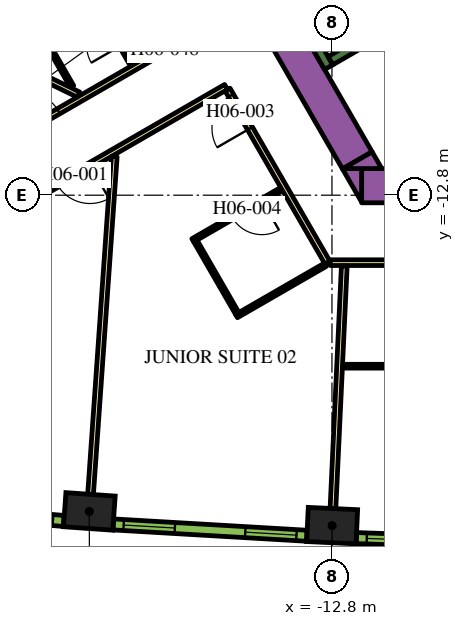
"""IFC4 building model, lengths in metres.
Left out: names, types, materials, properties, quantities, classifications, styles, units other than length and angle.
Written with IfcOpenShell. Run it as: python <this file> out.ifc"""

import sys

from ifc_helpers import new_model, si_unit, direction, frame, frame_2d, origin, origin_2d, place, context, subcontext, project, spatial, polyline, rectangle, outline, extrude, element, fill, save


model = new_model("IFC4")
c1 = context("Model", 3, precision=1e-05, world=origin(), true_north=direction((0.0, 1.0)))
c2 = subcontext(c1, "Body", "Model", "MODEL_VIEW")
j1 = project(units=[si_unit("LENGTHUNIT", "METRE"), si_unit("PLANEANGLEUNIT", "RADIAN")], contexts=[c1])
p1 = place(None, origin())
s1 = spatial("IfcSite", under=j1, at=p1, CompositionType="ELEMENT")
p2 = place(p1, origin())
s2 = spatial("IfcBuilding", under=s1, at=p2, CompositionType="ELEMENT")
p3 = place(p2, frame((0.0, 0.0, 91.5)))
s3 = spatial("IfcBuildingStorey", under=s2, at=p3, CompositionType="ELEMENT", Elevation=91.5)
for number, where, z_axis, x_axis in (
    (1, (-19.184, -21.12, 0.0), (0.0, 0.0, 1.0), (0.998, -0.07, 0.0)),
    (2, (-12.795, -21.494, 0.0), (0.0, 0.0, 1.0), (0.999, -0.047, 0.0)),
):
    element("IfcColumn", number, at=place(p3, frame(where, z_axis=z_axis, x_axis=x_axis)), inside=s3, PredefinedType="COLUMN", context=c2, shape_type="SweptSolid", body=[
        extrude(rectangle(XDim=1.3, YDim=0.9, at=origin_2d()), origin(), (0.0, 0.0, 1.0), 3.9),
    ])
p4 = place(p3, frame((-12.019, -12.55, 0.0), z_axis=(0.0, 0.0, 1.0), x_axis=(1.0, 0.0, 0.0)))
e3 = element("IfcWall", 3, at=p4, inside=s3, PredefinedType="SOLIDWALL", context=c2, shape_type="SweptSolid", body=[
    extrude(rectangle(XDim=21.63, YDim=0.9, at=frame_2d((10.815, 0.0))), origin(), (0.0, 0.0, 1.0), 3.9),
])
p5 = place(p3, origin())
e4 = element("IfcWall", 4, at=p5, inside=s3, PredefinedType="SOLIDWALL", context=c2, shape_type="SweptSolid", body=[
    extrude(outline(polyline([(-12.529, -12.1), (-12.021, -12.1), (-12.021, -12.98), (-12.529, -12.1)])), origin(), (0.0, 0.0, 1.0), 3.9),
])
p6 = place(p3, frame((-12.134, -11.883, 0.0), z_axis=(0.0, 0.0, 1.0), x_axis=(-0.500005339912, 0.866022320763, 0.0)))
e5 = element("IfcWall", 5, at=p6, inside=s3, PredefinedType="SOLIDWALL", context=c2, shape_type="SweptSolid", body=[
    extrude(rectangle(XDim=9.488, YDim=0.9, at=frame_2d((4.744, 0.0))), origin(), (0.0, 0.0, 1.0), 3.9),
])
e6 = element("IfcWall", 6, at=p5, inside=s3, PredefinedType="SOLIDWALL", context=c2, shape_type="SweptSolid", body=[
    extrude(outline(polyline([(-11.489, -12.1), (-12.505, -12.1), (-11.743, -11.66), (-11.489, -12.1)])), origin(), (0.0, 0.0, 1.0), 3.9),
])
p7 = place(p3, frame((-12.885, -9.431, 0.0), z_axis=(0.0, 0.0, 1.0), x_axis=(-0.500020560727, 0.866013532718, 0.0)))
e7 = element("IfcWall", 7, at=p7, inside=s3, PredefinedType="SOLIDWALL", context=c2, shape_type="SweptSolid", body=[
    extrude(rectangle(XDim=3.45, YDim=0.25, at=frame_2d((1.725, 0.0))), origin(), (0.0, 0.0, 1.0), 3.9),
])
p8 = place(p3, frame((-12.84, -9.261, 0.0), z_axis=(0.0, 0.0, 1.0), x_axis=(0.866016039709, 0.500016218704, 0.0)))
e8 = element("IfcWall", 8, at=p8, inside=s3, PredefinedType="SOLIDWALL", context=c2, shape_type="SweptSolid", body=[
    extrude(rectangle(XDim=7.05, YDim=0.25, at=frame_2d((3.525, 0.0))), origin(), (0.0, 0.0, 1.0), 3.9),
])
p9 = place(p3, frame((-28.211, -15.335, 0.0), z_axis=(0.0, 0.0, 1.0), x_axis=(0.866025884867, 0.49999916674, 0.0)))
e9 = element("IfcWall", 9, at=p9, inside=s3, PredefinedType="PARTITIONING", context=c2, shape_type="SweptSolid", body=[
    extrude(rectangle(XDim=13.543, YDim=0.15, at=frame_2d((6.772, 0.0))), origin(), (0.0, 0.0, 1.0), 2.75),
])
p10 = place(p9, frame((12.214, 0.0, 0.0)))
e10 = element("IfcOpeningElement", 10, at=p10, cuts=e9, PredefinedType="OPENING", context=c2, shape_type="SweptSolid", body=[
    extrude(rectangle(XDim=1.0, YDim=2.1, at=frame_2d((0.5, 1.05))), frame((0.0, 0.085, 0.0), z_axis=(0.0, -1.0, 0.0), x_axis=(1.0, 0.0, 0.0)), (0.0, 0.0, 1.0), 0.17),
])
p11 = place(p9, frame((8.488, 0.0, 0.0)))
e11 = element("IfcOpeningElement", 11, at=p11, cuts=e9, PredefinedType="OPENING", context=c2, shape_type="SweptSolid", body=[
    extrude(rectangle(XDim=1.0, YDim=2.1, at=frame_2d((0.5, 1.05))), frame((0.0, 0.085, 0.0), z_axis=(0.0, -1.0, 0.0), x_axis=(1.0, 0.0, 0.0)), (0.0, 0.0, 1.0), 0.17),
])
p12 = place(p3, frame((-15.587, -9.952, 0.0), z_axis=(0.0, 0.0, 1.0), x_axis=(-0.866017869832, -0.500013048961, 0.0)))
e12 = element("IfcWall", 12, at=p12, inside=s3, PredefinedType="PARTITIONING", context=c2, shape_type="SweptSolid", body=[
    extrude(rectangle(XDim=13.624, YDim=0.15, at=frame_2d((6.812, 0.0))), origin(), (0.0, 0.0, 1.0), 2.75),
])
p13 = place(p12, frame((4.134, 0.0, 0.0)))
e13 = element("IfcOpeningElement", 13, at=p13, cuts=e12, PredefinedType="OPENING", context=c2, shape_type="SweptSolid", body=[
    extrude(rectangle(XDim=1.0, YDim=2.1, at=frame_2d((0.5, 1.05))), frame((0.0, 0.085, 0.0), z_axis=(0.0, -1.0, 0.0), x_axis=(1.0, 0.0, 0.0)), (0.0, 0.0, 1.0), 0.17),
])
p14 = place(p3, frame((-12.918, -14.575, 0.0), z_axis=(0.0, 0.0, 1.0), x_axis=(-0.500009150678, 0.866020120573, 0.0)))
e14 = element("IfcWall", 14, at=p14, inside=s3, PredefinedType="PARTITIONING", context=c2, shape_type="SweptSolid", body=[
    extrude(rectangle(XDim=5.258, YDim=0.15, at=frame_2d((2.629, 0.0))), origin(), (0.0, 0.0, 1.0), 2.75),
])
p15 = place(p14, frame((4.078, 0.0, 0.0)))
e15 = element("IfcOpeningElement", 15, at=p15, cuts=e14, PredefinedType="OPENING", context=c2, shape_type="SweptSolid", body=[
    extrude(rectangle(XDim=1.0, YDim=2.1, at=frame_2d((0.5, 1.05))), frame((0.0, 0.085, 0.0), z_axis=(0.0, -1.0, 0.0), x_axis=(1.0, 0.0, 0.0)), (0.0, 0.0, 1.0), 0.17),
])
p16 = place(p3, frame((12.918, -14.575, 0.0), z_axis=(0.0, 0.0, 1.0), x_axis=(-1.0, 0.0, 0.0)))
e16 = element("IfcWall", 16, at=p16, inside=s3, PredefinedType="PARTITIONING", context=c2, shape_type="SweptSolid", body=[
    extrude(rectangle(XDim=25.766, YDim=0.15, at=frame_2d((12.883, 0.0))), origin(), (0.0, 0.0, 1.0), 2.75),
])
p17 = place(p16, frame((19.306, 0.0, 0.0)))
e17 = element("IfcOpeningElement", 17, at=p17, cuts=e16, PredefinedType="OPENING", context=c2, shape_type="SweptSolid", body=[
    extrude(rectangle(XDim=1.0, YDim=2.1, at=frame_2d((0.5, 1.05))), frame((0.0, 0.085, 0.0), z_axis=(0.0, -1.0, 0.0), x_axis=(1.0, 0.0, 0.0)), (0.0, 0.0, 1.0), 0.17),
])
p18 = place(p16, frame((17.999, 0.0, 0.0)))
e18 = element("IfcOpeningElement", 18, at=p18, cuts=e16, PredefinedType="OPENING", context=c2, shape_type="SweptSolid", body=[
    extrude(rectangle(XDim=1.0, YDim=2.1, at=frame_2d((0.5, 1.05))), frame((0.0, 0.085, 0.0), z_axis=(0.0, -1.0, 0.0), x_axis=(1.0, 0.0, 0.0)), (0.0, 0.0, 1.0), 0.17),
])
p19 = place(p16, frame((10.874, 0.0, 0.0)))
e19 = element("IfcOpeningElement", 19, at=p19, cuts=e16, PredefinedType="OPENING", context=c2, shape_type="SweptSolid", body=[
    extrude(rectangle(XDim=0.9, YDim=2.1, at=frame_2d((0.45, 1.05))), frame((0.0, 0.085, 0.0), z_axis=(0.0, -1.0, 0.0), x_axis=(1.0, 0.0, 0.0)), (0.0, 0.0, 1.0), 0.17),
])
p20 = place(p16, frame((8.647, 0.0, 0.0)))
e20 = element("IfcOpeningElement", 20, at=p20, cuts=e16, PredefinedType="OPENING", context=c2, shape_type="SweptSolid", body=[
    extrude(rectangle(XDim=1.0, YDim=2.1, at=frame_2d((0.5, 1.05))), frame((0.0, 0.085, 0.0), z_axis=(0.0, -1.0, 0.0), x_axis=(1.0, 0.0, 0.0)), (0.0, 0.0, 1.0), 0.17),
])
p21 = place(p16, frame((0.18, 0.0, 0.0)))
e21 = element("IfcOpeningElement", 21, at=p21, cuts=e16, PredefinedType="OPENING", context=c2, shape_type="SweptSolid", body=[
    extrude(rectangle(XDim=1.0, YDim=2.1, at=frame_2d((0.5, 1.05))), frame((0.0, 0.085, 0.0), z_axis=(0.0, -1.0, 0.0), x_axis=(1.0, 0.0, 0.0)), (0.0, 0.0, 1.0), 0.17),
])
p22 = place(p3, frame((-27.479, -6.251, 0.0), z_axis=(0.0, 0.0, 1.0), x_axis=(0.898945877276, -0.438059710231, 0.0)))
e22 = element("IfcWall", 22, at=p22, inside=s3, PredefinedType="PARTITIONING", context=c2, shape_type="SweptSolid", body=[
    extrude(rectangle(XDim=8.909, YDim=0.15, at=frame_2d((4.455, 0.0))), origin(), (0.0, 0.0, 1.0), 2.75),
])
p23 = place(p3, frame((-19.153, -20.671, 0.0), z_axis=(0.0, 0.0, 1.0), x_axis=(0.070070736723, 0.997542025107, 0.0)))
e23 = element("IfcWall", 23, at=p23, inside=s3, PredefinedType="PARTITIONING", context=c2, shape_type="SweptSolid", body=[
    extrude(rectangle(XDim=8.909, YDim=0.15, at=frame_2d((4.455, 0.0))), origin(), (0.0, 0.0, 1.0), 2.75),
])
p24 = place(p3, frame((-12.774, -21.045, 0.0), z_axis=(0.0, 0.0, 1.0), x_axis=(0.046750341626, 0.998906605023, 0.0)))
e24 = element("IfcWall", 24, at=p24, inside=s3, PredefinedType="PARTITIONING", context=c2, shape_type="SweptSolid", body=[
    extrude(rectangle(XDim=6.392, YDim=0.15, at=frame_2d((3.196, 0.0))), origin(), (0.0, 0.0, 1.0), 2.75),
])
p25 = place(p3, frame((-14.123, -12.638, 0.0), z_axis=(0.0, 0.0, 1.0), x_axis=(-0.86599734893, -0.500048589285, 0.0)))
e25 = element("IfcWall", 25, at=p25, inside=s3, PredefinedType="PARTITIONING", context=c2, shape_type="SweptSolid", body=[
    extrude(rectangle(XDim=2.7, YDim=0.1, at=frame_2d((1.35, 0.0))), origin(), (0.0, 0.0, 1.0), 2.75),
])
p26 = place(p25, frame((0.6, 0.0, 0.0)))
e26 = element("IfcOpeningElement", 26, at=p26, cuts=e25, PredefinedType="OPENING", context=c2, shape_type="SweptSolid", body=[
    extrude(rectangle(XDim=0.9, YDim=2.1, at=frame_2d((0.45, 1.05))), frame((0.0, 0.06, 0.0), z_axis=(0.0, -1.0, 0.0), x_axis=(1.0, 0.0, 0.0)), (0.0, 0.0, 1.0), 0.12),
])
p27 = place(p3, frame((-16.393, -14.006, 0.0), z_axis=(0.0, 0.0, 1.0), x_axis=(0.499946605688, -0.86605622881, 0.0)))
e27 = element("IfcWall", 27, at=p27, inside=s3, PredefinedType="PARTITIONING", context=c2, shape_type="SweptSolid", body=[
    extrude(rectangle(XDim=2.2, YDim=0.1, at=frame_2d((1.1, 0.0))), origin(), (0.0, 0.0, 1.0), 2.75),
])
p28 = place(p3, frame((-12.973, -14.63, 0.0), z_axis=(0.0, 0.0, 1.0), x_axis=(-0.866036505625, -0.499980770555, 0.0)))
e28 = element("IfcWall", 28, at=p28, inside=s3, PredefinedType="PARTITIONING", context=c2, shape_type="SweptSolid", body=[
    extrude(rectangle(XDim=2.7, YDim=0.1, at=frame_2d((1.35, 0.0))), origin(), (0.0, 0.0, 1.0), 2.75),
])
p29 = place(p3, frame((-10.272, -17.3, 0.0), z_axis=(0.0, 0.0, 1.0), x_axis=(-1.0, 0.0, 0.0)))
e29 = element("IfcWall", 29, at=p29, inside=s3, PredefinedType="PARTITIONING", context=c2, shape_type="SweptSolid", body=[
    extrude(rectangle(XDim=2.25, YDim=0.1, at=frame_2d((1.125, 0.0))), origin(), (0.0, 0.0, 1.0), 2.75),
])
p30 = place(p3, frame((-18.055, -9.385, 0.0), z_axis=(0.0, 0.0, 1.0), x_axis=(-0.499939757307, 0.866060182126, 0.0)))
e30 = element("IfcWall", 30, at=p30, inside=s3, PredefinedType="PARTITIONING", context=c2, shape_type="SweptSolid", body=[
    extrude(rectangle(XDim=2.95, YDim=0.1, at=frame_2d((1.475, 0.0))), origin(), (0.0, 0.0, 1.0), 2.75),
])
p31 = place(p30, frame((0.6, 0.0, 0.0)))
e31 = element("IfcOpeningElement", 31, at=p31, cuts=e30, PredefinedType="OPENING", context=c2, shape_type="SweptSolid", body=[
    extrude(rectangle(XDim=0.9, YDim=2.1, at=frame_2d((0.45, 1.05))), frame((0.0, 0.06, 0.0), z_axis=(0.0, -1.0, 0.0), x_axis=(1.0, 0.0, 0.0)), (0.0, 0.0, 1.0), 0.12),
])
p32 = place(p3, frame((-19.639, -9.941, 0.0), z_axis=(0.0, 0.0, 1.0), x_axis=(-0.499938597367, 0.866060851709, 0.0)))
e32 = element("IfcWall", 32, at=p32, inside=s3, PredefinedType="PARTITIONING", context=c2, shape_type="SweptSolid", body=[
    extrude(rectangle(XDim=2.64, YDim=0.1, at=frame_2d((1.32, 0.0))), origin(), (0.0, 0.0, 1.0), 2.75),
])
p33 = place(p3, frame((-24.946, -20.954, 0.0), z_axis=(0.0, 0.0, 1.0), x_axis=(0.99665273362, -0.081751627308, 0.0)))
e33 = element("IfcWall", 33, at=p33, inside=s3, PredefinedType="SOLIDWALL", context=c2, shape_type="SweptSolid", body=[
    extrude(rectangle(XDim=5.107, YDim=0.29, at=frame_2d((2.553, 0.0))), origin(), (0.0, 0.0, 1.0), 3.65),
])
p34 = place(p33, frame((0.24, 0.0, 0.9)))
e34 = element("IfcOpeningElement", 34, at=p34, cuts=e33, PredefinedType="OPENING", context=c2, shape_type="SweptSolid", body=[
    extrude(rectangle(XDim=1.35, YDim=2.15, at=frame_2d((0.675, 1.075))), frame((0.0, 0.155, 0.0), z_axis=(0.0, -1.0, 0.0), x_axis=(1.0, 0.0, 0.0)), (0.0, 0.0, 1.0), 0.31),
])
p35 = place(p33, frame((3.471, 0.0, 0.9)))
e35 = element("IfcOpeningElement", 35, at=p35, cuts=e33, PredefinedType="OPENING", context=c2, shape_type="SweptSolid", body=[
    extrude(rectangle(XDim=1.35, YDim=2.15, at=frame_2d((0.675, 1.075))), frame((0.0, 0.155, 0.0), z_axis=(0.0, -1.0, 0.0), x_axis=(1.0, 0.0, 0.0)), (0.0, 0.0, 1.0), 0.31),
])
p36 = place(p3, frame((-18.553, -21.463, 0.0), z_axis=(0.0, 0.0, 1.0), x_axis=(0.998290511436, -0.058447025388, 0.0)))
e36 = element("IfcWall", 36, at=p36, inside=s3, PredefinedType="SOLIDWALL", context=c2, shape_type="SweptSolid", body=[
    extrude(rectangle(XDim=5.1, YDim=0.29, at=frame_2d((2.55, 0.0))), origin(), (0.0, 0.0, 1.0), 3.65),
])
p37 = place(p36, frame((0.273, 0.0, 0.9)))
e37 = element("IfcOpeningElement", 37, at=p37, cuts=e36, PredefinedType="OPENING", context=c2, shape_type="SweptSolid", body=[
    extrude(rectangle(XDim=1.35, YDim=2.15, at=frame_2d((0.675, 1.075))), frame((0.0, 0.155, 0.0), z_axis=(0.0, -1.0, 0.0), x_axis=(1.0, 0.0, 0.0)), (0.0, 0.0, 1.0), 0.31),
])
p38 = place(p36, frame((3.478, 0.0, 0.9)))
e38 = element("IfcOpeningElement", 38, at=p38, cuts=e36, PredefinedType="OPENING", context=c2, shape_type="SweptSolid", body=[
    extrude(rectangle(XDim=1.35, YDim=2.15, at=frame_2d((0.675, 1.075))), frame((0.0, 0.155, 0.0), z_axis=(0.0, -1.0, 0.0), x_axis=(1.0, 0.0, 0.0)), (0.0, 0.0, 1.0), 0.31),
])
p39 = place(p3, frame((-12.157, -21.822, 0.0), z_axis=(0.0, 0.0, 1.0), x_axis=(0.999385993957, -0.035037623812, 0.0)))
e39 = element("IfcWall", 39, at=p39, inside=s3, PredefinedType="SOLIDWALL", context=c2, shape_type="SweptSolid", body=[
    extrude(rectangle(XDim=5.101, YDim=0.29, at=frame_2d((2.55, 0.0))), origin(), (0.0, 0.0, 1.0), 3.65),
])
p40 = place(p39, frame((0.273, 0.0, 0.9)))
e40 = element("IfcOpeningElement", 40, at=p40, cuts=e39, PredefinedType="OPENING", context=c2, shape_type="SweptSolid", body=[
    extrude(rectangle(XDim=1.35, YDim=2.15, at=frame_2d((0.675, 1.075))), frame((0.0, 0.155, 0.0), z_axis=(0.0, -1.0, 0.0), x_axis=(1.0, 0.0, 0.0)), (0.0, 0.0, 1.0), 0.31),
])
p41 = place(p39, frame((3.478, 0.0, 0.9)))
e41 = element("IfcOpeningElement", 41, at=p41, cuts=e39, PredefinedType="OPENING", context=c2, shape_type="SweptSolid", body=[
    extrude(rectangle(XDim=1.35, YDim=2.15, at=frame_2d((0.675, 1.075))), frame((0.0, 0.155, 0.0), z_axis=(0.0, -1.0, 0.0), x_axis=(1.0, 0.0, 0.0)), (0.0, 0.0, 1.0), 0.31),
])
p42 = place(p13, origin())
e42 = element("IfcDoor", 42, at=p42, inside=s3, OperationType="SINGLE_SWING_LEFT", PredefinedType="DOOR", context=c2, shape_type="SweptSolid", body=[
    extrude(rectangle(XDim=1.0, YDim=2.1, at=frame_2d((0.5, 1.05))), frame((0.0, 0.025, 0.0), z_axis=(0.0, -1.0, 0.0), x_axis=(1.0, 0.0, 0.0)), (0.0, 0.0, 1.0), 0.05),
])
fill(e13, e42)
p43 = place(p15, origin())
e43 = element("IfcDoor", 43, at=p43, inside=s3, OperationType="SINGLE_SWING_RIGHT", PredefinedType="DOOR", context=c2, shape_type="SweptSolid", body=[
    extrude(rectangle(XDim=1.0, YDim=2.1, at=frame_2d((0.5, 1.05))), frame((0.0, 0.025, 0.0), z_axis=(0.0, -1.0, 0.0), x_axis=(1.0, 0.0, 0.0)), (0.0, 0.0, 1.0), 0.05),
])
fill(e15, e43)
p44 = place(p26, origin())
e44 = element("IfcDoor", 44, at=p44, inside=s3, OperationType="SINGLE_SWING_LEFT", PredefinedType="DOOR", context=c2, shape_type="SweptSolid", body=[
    extrude(rectangle(XDim=0.9, YDim=2.1, at=frame_2d((0.45, 1.05))), frame((0.0, 0.025, 0.0), z_axis=(0.0, -1.0, 0.0), x_axis=(1.0, 0.0, 0.0)), (0.0, 0.0, 1.0), 0.05),
])
fill(e26, e44)
p45 = place(p10, origin())
e45 = element("IfcDoor", 45, at=p45, inside=s3, OperationType="SINGLE_SWING_RIGHT", PredefinedType="DOOR", context=c2, shape_type="SweptSolid", body=[
    extrude(rectangle(XDim=1.0, YDim=2.1, at=frame_2d((0.5, 1.05))), frame((0.0, 0.025, 0.0), z_axis=(0.0, -1.0, 0.0), x_axis=(1.0, 0.0, 0.0)), (0.0, 0.0, 1.0), 0.05),
])
fill(e10, e45)
p46 = place(p11, origin())
e46 = element("IfcDoor", 46, at=p46, inside=s3, OperationType="SINGLE_SWING_RIGHT", PredefinedType="DOOR", context=c2, shape_type="SweptSolid", body=[
    extrude(rectangle(XDim=1.0, YDim=2.1, at=frame_2d((0.5, 1.05))), frame((0.0, 0.025, 0.0), z_axis=(0.0, -1.0, 0.0), x_axis=(1.0, 0.0, 0.0)), (0.0, 0.0, 1.0), 0.05),
])
fill(e11, e46)
p47 = place(p35, origin())
e47 = element("IfcWindow", 47, at=p47, inside=s3, PartitioningType="DOUBLE_PANEL_VERTICAL", PredefinedType="WINDOW", context=c2, shape_type="SweptSolid", body=[
    extrude(rectangle(XDim=1.35, YDim=2.15, at=frame_2d((0.675, 1.075))), frame((0.0, 0.015, 0.0), z_axis=(0.0, -1.0, 0.0), x_axis=(1.0, 0.0, 0.0)), (0.0, 0.0, 1.0), 0.06),
])
fill(e35, e47)
p48 = place(p37, origin())
e48 = element("IfcWindow", 48, at=p48, inside=s3, PartitioningType="DOUBLE_PANEL_VERTICAL", PredefinedType="WINDOW", context=c2, shape_type="SweptSolid", body=[
    extrude(rectangle(XDim=1.35, YDim=2.15, at=frame_2d((0.675, 1.075))), frame((0.0, 0.015, 0.0), z_axis=(0.0, -1.0, 0.0), x_axis=(1.0, 0.0, 0.0)), (0.0, 0.0, 1.0), 0.06),
])
fill(e37, e48)
p49 = place(p38, origin())
e49 = element("IfcWindow", 49, at=p49, inside=s3, PartitioningType="DOUBLE_PANEL_VERTICAL", PredefinedType="WINDOW", context=c2, shape_type="SweptSolid", body=[
    extrude(rectangle(XDim=1.35, YDim=2.15, at=frame_2d((0.675, 1.075))), frame((0.0, 0.015, 0.0), z_axis=(0.0, -1.0, 0.0), x_axis=(1.0, 0.0, 0.0)), (0.0, 0.0, 1.0), 0.06),
])
fill(e38, e49)
p50 = place(p40, origin())
e50 = element("IfcWindow", 50, at=p50, inside=s3, PartitioningType="DOUBLE_PANEL_VERTICAL", PredefinedType="WINDOW", context=c2, shape_type="SweptSolid", body=[
    extrude(rectangle(XDim=1.35, YDim=2.15, at=frame_2d((0.675, 1.075))), frame((0.0, 0.015, 0.0), z_axis=(0.0, -1.0, 0.0), x_axis=(1.0, 0.0, 0.0)), (0.0, 0.0, 1.0), 0.06),
])
fill(e40, e50)
save(model, sys.argv[1])
